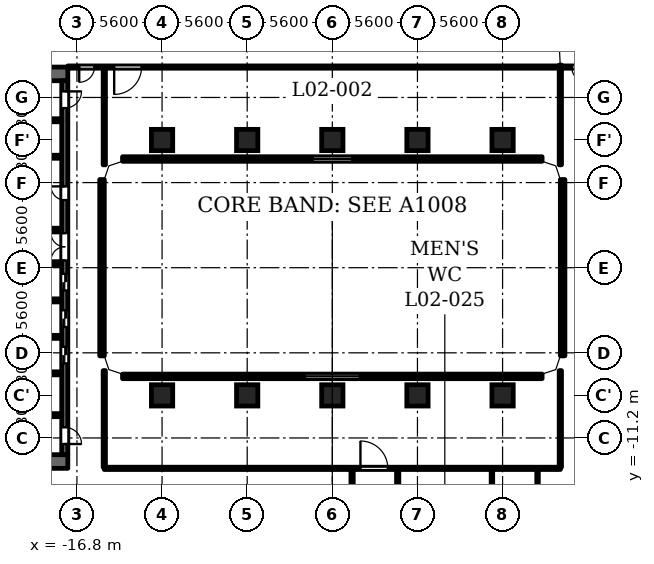
"""IFC4 building model, lengths in metres.
Left out: names, types, materials, properties, quantities, classifications, styles, units other than length and angle.
Written with IfcOpenShell. Run it as: python <this file> out.ifc"""

import sys

from ifc_helpers import new_model, si_unit, direction, frame, frame_2d, origin, origin_2d, place, context, subcontext, project, spatial, polyline, rectangle, outline, extrude, element, fill, save


model = new_model("IFC4")
c1 = context("Model", 3, precision=1e-05, world=origin(), true_north=direction((0.0, 1.0)))
c2 = subcontext(c1, "Body", "Model", "MODEL_VIEW")
j1 = project(units=[si_unit("LENGTHUNIT", "METRE"), si_unit("PLANEANGLEUNIT", "RADIAN")], contexts=[c1])
p1 = place(None, origin())
s1 = spatial("IfcSite", under=j1, at=p1, CompositionType="ELEMENT")
p2 = place(p1, origin())
s2 = spatial("IfcBuilding", under=s1, at=p2, CompositionType="ELEMENT")
p3 = place(p2, frame((0.0, 0.0, 11.3)))
s3 = spatial("IfcBuildingStorey", under=s2, at=p3, CompositionType="ELEMENT", Elevation=11.3)
for number, where, z_axis, x_axis in (
    (1, (-11.2, -8.4, 0.0), (0.0, 0.0, 1.0), (1.0, 0.0, 0.0)),
    (2, (-11.2, 8.4, 0.0), (0.0, 0.0, 1.0), (1.0, 0.0, 0.0)),
    (3, (-5.6, -8.4, 0.0), (0.0, 0.0, 1.0), (1.0, 0.0, 0.0)),
    (4, (-5.6, 8.4, 0.0), (0.0, 0.0, 1.0), (1.0, 0.0, 0.0)),
    (5, (0.0, -8.4, 0.0), (0.0, 0.0, 1.0), (1.0, 0.0, 0.0)),
    (6, (0.0, 8.4, 0.0), (0.0, 0.0, 1.0), (1.0, 0.0, 0.0)),
    (7, (5.6, -8.4, 0.0), (0.0, 0.0, 1.0), (1.0, 0.0, 0.0)),
    (8, (5.6, 8.4, 0.0), (0.0, 0.0, 1.0), (1.0, 0.0, 0.0)),
    (9, (11.2, -8.4, 0.0), (0.0, 0.0, 1.0), (1.0, 0.0, 0.0)),
    (10, (11.2, 8.4, 0.0), (0.0, 0.0, 1.0), (1.0, 0.0, 0.0)),
):
    element("IfcColumn", number, at=place(p3, frame(where, z_axis=z_axis, x_axis=x_axis)), inside=s3, PredefinedType="COLUMN", context=c2, shape_type="SweptSolid", body=[
        extrude(rectangle(XDim=1.4, YDim=1.4, at=origin_2d()), origin(), (0.0, 0.0, 1.0), 4.8),
    ])
p4 = place(p3, frame((-15.15, -5.8, 0.0), z_axis=(0.0, 0.0, 1.0), x_axis=(0.0, 1.0, 0.0)))
e11 = element("IfcWall", 11, at=p4, inside=s3, PredefinedType="SOLIDWALL", context=c2, shape_type="SweptSolid", body=[
    extrude(rectangle(XDim=11.6, YDim=0.3, at=frame_2d((5.8, 0.0))), origin(), (0.0, 0.0, 1.0), 4.45),
])
p5 = place(p3, frame((-13.8, 7.15, 0.0), z_axis=(0.0, 0.0, 1.0), x_axis=(1.0, 0.0, 0.0)))
e12 = element("IfcWall", 12, at=p5, inside=s3, PredefinedType="SOLIDWALL", context=c2, shape_type="SweptSolid", body=[
    extrude(rectangle(XDim=27.6, YDim=0.3, at=frame_2d((13.8, 0.0))), origin(), (0.0, 0.0, 1.0), 4.45),
])
p6 = place(p5, frame((12.5, 0.0, 0.9)))
e13 = element("IfcOpeningElement", 13, at=p6, cuts=e12, PredefinedType="OPENING", context=c2, shape_type="SweptSolid", body=[
    extrude(rectangle(XDim=2.6, YDim=1.25, at=frame_2d((1.3, 0.625))), frame((0.0, 0.16, 0.0), z_axis=(0.0, -1.0, 0.0), x_axis=(1.0, 0.0, 0.0)), (0.0, 0.0, 1.0), 0.32),
])
p7 = place(p3, frame((15.15, 5.8, 0.0), z_axis=(0.0, 0.0, 1.0), x_axis=(0.0, -1.0, 0.0)))
e14 = element("IfcWall", 14, at=p7, inside=s3, PredefinedType="SOLIDWALL", context=c2, shape_type="SweptSolid", body=[
    extrude(rectangle(XDim=11.6, YDim=0.3, at=frame_2d((5.8, 0.0))), origin(), (0.0, 0.0, 1.0), 4.45),
])
p8 = place(p3, frame((13.8, -7.15, 0.0), z_axis=(0.0, 0.0, 1.0), x_axis=(-1.0, 0.0, 0.0)))
e15 = element("IfcWall", 15, at=p8, inside=s3, PredefinedType="SOLIDWALL", context=c2, shape_type="SweptSolid", body=[
    extrude(rectangle(XDim=27.6, YDim=0.3, at=frame_2d((13.8, 0.0))), origin(), (0.0, 0.0, 1.0), 4.45),
])
p9 = place(p8, frame((12.0, 0.0, 1.2)))
e16 = element("IfcOpeningElement", 16, at=p9, cuts=e15, PredefinedType="OPENING", context=c2, shape_type="SweptSolid", body=[
    extrude(rectangle(XDim=3.6, YDim=0.95, at=frame_2d((1.8, 0.475))), frame((0.0, 0.16, 0.0), z_axis=(0.0, -1.0, 0.0), x_axis=(1.0, 0.0, 0.0)), (0.0, 0.0, 1.0), 0.32),
])
for number, where, z_axis, x_axis in (
    (17, (-17.4, 12.75, 0.0), (0.0, 0.0, 1.0), (-1.0, 0.0, 0.0)),
    (18, (-17.4, -12.75, 0.0), (0.0, 0.0, 1.0), (-1.0, 0.0, 0.0)),
):
    element("IfcWall", number, at=place(p3, frame(where, z_axis=z_axis, x_axis=x_axis)), inside=s3, PredefinedType="SHEAR", context=c2, shape_type="SweptSolid", body=[
        extrude(rectangle(XDim=10.4, YDim=0.9, at=frame_2d((5.2, 0.0))), origin(), (0.0, 0.0, 1.0), 4.45),
    ])
p10 = place(p3, frame((-17.6, -12.3, 0.0), z_axis=(0.0, 0.0, 1.0), x_axis=(0.0, 1.0, 0.0)))
e19 = element("IfcWall", 19, at=p10, inside=s3, PredefinedType="SHEAR", context=c2, shape_type="SweptSolid", body=[
    extrude(rectangle(XDim=24.6, YDim=0.4, at=frame_2d((12.3, 0.0))), origin(), (0.0, 0.0, 1.0), 4.45),
])
p11 = place(p10, frame((6.0, 0.0, 0.0)))
e20 = element("IfcOpeningElement", 20, at=p11, cuts=e19, PredefinedType="OPENING", context=c2, shape_type="SweptSolid", body=[
    extrude(rectangle(XDim=1.1, YDim=2.1, at=frame_2d((0.55, 1.05))), frame((0.0, 0.21, 0.0), z_axis=(0.0, -1.0, 0.0), x_axis=(1.0, 0.0, 0.0)), (0.0, 0.0, 1.0), 0.42),
])
p12 = place(p10, frame((8.4, 0.0, 0.0)))
e21 = element("IfcOpeningElement", 21, at=p12, cuts=e19, PredefinedType="OPENING", context=c2, shape_type="SweptSolid", body=[
    extrude(rectangle(XDim=1.1, YDim=2.1, at=frame_2d((0.55, 1.05))), frame((0.0, 0.21, 0.0), z_axis=(0.0, -1.0, 0.0), x_axis=(1.0, 0.0, 0.0)), (0.0, 0.0, 1.0), 0.42),
])
p13 = place(p10, frame((10.8, 0.0, 0.0)))
e22 = element("IfcOpeningElement", 22, at=p13, cuts=e19, PredefinedType="OPENING", context=c2, shape_type="SweptSolid", body=[
    extrude(rectangle(XDim=1.1, YDim=2.1, at=frame_2d((0.55, 1.05))), frame((0.0, 0.21, 0.0), z_axis=(0.0, -1.0, 0.0), x_axis=(1.0, 0.0, 0.0)), (0.0, 0.0, 1.0), 0.42),
])
p14 = place(p10, frame((16.75, 0.0, 0.0)))
e23 = element("IfcOpeningElement", 23, at=p14, cuts=e19, PredefinedType="OPENING", context=c2, shape_type="SweptSolid", body=[
    extrude(rectangle(XDim=0.9, YDim=2.1, at=frame_2d((0.45, 1.05))), frame((0.0, 0.21, 0.0), z_axis=(0.0, -1.0, 0.0), x_axis=(1.0, 0.0, 0.0)), (0.0, 0.0, 1.0), 0.42),
])
p15 = place(p10, frame((22.8, 0.0, 0.0)))
e24 = element("IfcOpeningElement", 24, at=p15, cuts=e19, PredefinedType="OPENING", context=c2, shape_type="SweptSolid", body=[
    extrude(rectangle(XDim=1.1, YDim=2.1, at=frame_2d((0.55, 1.05))), frame((0.0, 0.21, 0.0), z_axis=(0.0, -1.0, 0.0), x_axis=(1.0, 0.0, 0.0)), (0.0, 0.0, 1.0), 0.42),
])
p16 = place(p10, frame((0.7, 0.0, 0.0)))
e25 = element("IfcOpeningElement", 25, at=p16, cuts=e19, PredefinedType="OPENING", context=c2, shape_type="SweptSolid", body=[
    extrude(rectangle(XDim=1.1, YDim=2.1, at=frame_2d((0.55, 1.05))), frame((0.0, 0.21, 0.0), z_axis=(0.0, -1.0, 0.0), x_axis=(1.0, 0.0, 0.0)), (0.0, 0.0, 1.0), 0.42),
])
p17 = place(p10, frame((12.775, 0.0, 0.0)))
e26 = element("IfcOpeningElement", 26, at=p17, cuts=e19, PredefinedType="OPENING", context=c2, shape_type="SweptSolid", body=[
    extrude(rectangle(XDim=1.8, YDim=2.1, at=frame_2d((0.9, 1.05))), frame((0.0, 0.21, 0.0), z_axis=(0.0, -1.0, 0.0), x_axis=(1.0, 0.0, 0.0)), (0.0, 0.0, 1.0), 0.42),
])
p18 = place(p3, frame((-17.8, -9.7, 0.0), z_axis=(0.0, 0.0, 1.0), x_axis=(-1.0, 0.0, 0.0)))
e27 = element("IfcWall", 27, at=p18, inside=s3, PredefinedType="SHEAR", context=c2, shape_type="SweptSolid", body=[
    extrude(rectangle(XDim=8.3, YDim=0.2, at=frame_2d((4.15, 0.0))), origin(), (0.0, 0.0, 1.0), 4.45),
])
p19 = place(p18, frame((0.85, 0.0, 0.0)))
e28 = element("IfcOpeningElement", 28, at=p19, cuts=e27, PredefinedType="OPENING", context=c2, shape_type="SweptSolid", body=[
    extrude(rectangle(XDim=1.1, YDim=2.1, at=frame_2d((0.55, 1.05))), frame((0.0, 0.11, 0.0), z_axis=(0.0, -1.0, 0.0), x_axis=(1.0, 0.0, 0.0)), (0.0, 0.0, 1.0), 0.22),
])
p20 = place(p18, frame((3.75, 0.0, 0.0)))
e29 = element("IfcOpeningElement", 29, at=p20, cuts=e27, PredefinedType="OPENING", context=c2, shape_type="SweptSolid", body=[
    extrude(rectangle(XDim=1.1, YDim=2.1, at=frame_2d((0.55, 1.05))), frame((0.0, 0.11, 0.0), z_axis=(0.0, -1.0, 0.0), x_axis=(1.0, 0.0, 0.0)), (0.0, 0.0, 1.0), 0.22),
])
for number, where, z_axis, x_axis in (
    (30, (-17.8, -6.95, 0.0), (0.0, 0.0, 1.0), (-1.0, 0.0, 0.0)),
    (31, (-17.8, -4.55, 0.0), (0.0, 0.0, 1.0), (-1.0, 0.0, 0.0)),
    (32, (-17.8, -2.15, 0.0), (0.0, 0.0, 1.0), (-1.0, 0.0, 0.0)),
):
    element("IfcWall", number, at=place(p3, frame(where, z_axis=z_axis, x_axis=x_axis)), inside=s3, PredefinedType="PARTITIONING", context=c2, shape_type="SweptSolid", body=[
        extrude(rectangle(XDim=2.8, YDim=0.2, at=frame_2d((1.4, 0.0))), origin(), (0.0, 0.0, 1.0), 4.45),
    ])
for number, where, z_axis, x_axis in (
    (33, (-17.8, 0.25, 0.0), (0.0, 0.0, 1.0), (-1.0, 0.0, 0.0)),
    (34, (-17.8, 2.5, 0.0), (0.0, 0.0, 1.0), (-1.0, 0.0, 0.0)),
):
    element("IfcWall", number, at=place(p3, frame(where, z_axis=z_axis, x_axis=x_axis)), inside=s3, PredefinedType="PARTITIONING", context=c2, shape_type="SweptSolid", body=[
        extrude(rectangle(XDim=3.0, YDim=0.2, at=frame_2d((1.5, 0.0))), origin(), (0.0, 0.0, 1.0), 4.45),
    ])
p21 = place(p3, frame((-17.8, 7.3, 0.0), z_axis=(0.0, 0.0, 1.0), x_axis=(-1.0, 0.0, 0.0)))
e35 = element("IfcWall", 35, at=p21, inside=s3, PredefinedType="PARTITIONING", context=c2, shape_type="SweptSolid", body=[
    extrude(rectangle(XDim=2.8, YDim=0.2, at=frame_2d((1.4, 0.0))), origin(), (0.0, 0.0, 1.0), 4.45),
])
p22 = place(p3, frame((-17.8, 9.7, 0.0), z_axis=(0.0, 0.0, 1.0), x_axis=(-1.0, 0.0, 0.0)))
e36 = element("IfcWall", 36, at=p22, inside=s3, PredefinedType="SHEAR", context=c2, shape_type="SweptSolid", body=[
    extrude(rectangle(XDim=8.3, YDim=0.2, at=frame_2d((4.15, 0.0))), origin(), (0.0, 0.0, 1.0), 4.45),
])
p23 = place(p22, frame((0.85, 0.0, 0.0)))
e37 = element("IfcOpeningElement", 37, at=p23, cuts=e36, PredefinedType="OPENING", context=c2, shape_type="SweptSolid", body=[
    extrude(rectangle(XDim=1.1, YDim=2.1, at=frame_2d((0.55, 1.05))), frame((0.0, 0.11, 0.0), z_axis=(0.0, -1.0, 0.0), x_axis=(1.0, 0.0, 0.0)), (0.0, 0.0, 1.0), 0.22),
])
p24 = place(p22, frame((3.75, 0.0, 0.0)))
e38 = element("IfcOpeningElement", 38, at=p24, cuts=e36, PredefinedType="OPENING", context=c2, shape_type="SweptSolid", body=[
    extrude(rectangle(XDim=1.1, YDim=2.1, at=frame_2d((0.55, 1.05))), frame((0.0, 0.11, 0.0), z_axis=(0.0, -1.0, 0.0), x_axis=(1.0, 0.0, 0.0)), (0.0, 0.0, 1.0), 0.22),
])
p25 = place(p3, frame((-15.005, -13.2, 0.0), z_axis=(0.0, 0.0, 1.0), x_axis=(1.0, 0.0, 0.0)))
e39 = element("IfcWall", 39, at=p25, inside=s3, PredefinedType="PARTITIONING", context=c2, shape_type="SweptSolid", body=[
    extrude(rectangle(XDim=30.01, YDim=0.15, at=frame_2d((15.005, 0.0))), origin(), (0.0, 0.0, 1.0), 4.45),
])
p26 = place(p25, frame((16.855, 0.0, 0.0)))
e40 = element("IfcOpeningElement", 40, at=p26, cuts=e39, PredefinedType="OPENING", context=c2, shape_type="SweptSolid", body=[
    extrude(rectangle(XDim=1.8, YDim=2.1, at=frame_2d((0.9, 1.05))), frame((0.0, 0.085, 0.0), z_axis=(0.0, -1.0, 0.0), x_axis=(1.0, 0.0, 0.0)), (0.0, 0.0, 1.0), 0.17),
])
p27 = place(p3, frame((-17.4, 13.2, 0.0), z_axis=(0.0, 0.0, 1.0), x_axis=(1.0, 0.0, 0.0)))
e41 = element("IfcWall", 41, at=p27, inside=s3, PredefinedType="PARTITIONING", context=c2, shape_type="SweptSolid", body=[
    extrude(rectangle(XDim=34.8, YDim=0.15, at=frame_2d((17.4, 0.0))), origin(), (0.0, 0.0, 1.0), 4.45),
])
p28 = place(p27, frame((3.05, 0.0, 0.0)))
e42 = element("IfcOpeningElement", 42, at=p28, cuts=e41, PredefinedType="OPENING", context=c2, shape_type="SweptSolid", body=[
    extrude(rectangle(XDim=1.8, YDim=2.1, at=frame_2d((0.9, 1.05))), frame((0.0, 0.085, 0.0), z_axis=(0.0, -1.0, 0.0), x_axis=(1.0, 0.0, 0.0)), (0.0, 0.0, 1.0), 0.17),
])
p29 = place(p27, frame((0.75, 0.0, 0.0)))
e43 = element("IfcOpeningElement", 43, at=p29, cuts=e41, PredefinedType="OPENING", context=c2, shape_type="SweptSolid", body=[
    extrude(rectangle(XDim=1.0, YDim=2.1, at=frame_2d((0.5, 1.05))), frame((0.0, 0.085, 0.0), z_axis=(0.0, -1.0, 0.0), x_axis=(1.0, 0.0, 0.0)), (0.0, 0.0, 1.0), 0.17),
])
p30 = place(p27, frame((33.15, 0.0, 0.0)))
e44 = element("IfcOpeningElement", 44, at=p30, cuts=e41, PredefinedType="OPENING", context=c2, shape_type="SweptSolid", body=[
    extrude(rectangle(XDim=1.0, YDim=2.1, at=frame_2d((0.5, 1.05))), frame((0.0, 0.085, 0.0), z_axis=(0.0, -1.0, 0.0), x_axis=(1.0, 0.0, 0.0)), (0.0, 0.0, 1.0), 0.17),
])
for number, where, z_axis, x_axis in (
    (45, (-15.0, -13.125, 0.0), (0.0, 0.0, 1.0), (0.0, 1.0, 0.0)),
    (46, (-15.0, 6.769, 0.0), (0.0, 0.0, 1.0), (0.0, 1.0, 0.0)),
):
    element("IfcWall", number, at=place(p3, frame(where, z_axis=z_axis, x_axis=x_axis)), inside=s3, PredefinedType="PARTITIONING", context=c2, shape_type="SweptSolid", body=[
        extrude(rectangle(XDim=6.356, YDim=0.15, at=frame_2d((3.178, 0.0))), origin(), (0.0, 0.0, 1.0), 4.45),
    ])
for number, where, z_axis, x_axis in (
    (47, (1.3, -22.325, 0.0), (0.0, 0.0, 1.0), (0.0, 1.0, 0.0)),
    (48, (4.3, -22.325, 0.0), (0.0, 0.0, 1.0), (0.0, 1.0, 0.0)),
):
    element("IfcWall", number, at=place(p3, frame(where, z_axis=z_axis, x_axis=x_axis)), inside=s3, PredefinedType="PARTITIONING", context=c2, shape_type="SweptSolid", body=[
        extrude(rectangle(XDim=9.05, YDim=0.15, at=frame_2d((4.525, 0.0))), origin(), (0.0, 0.0, 1.0), 4.45),
    ])
for number, where, z_axis, x_axis in (
    (49, (10.5, -22.325, 0.0), (0.0, 0.0, 1.0), (0.0, 1.0, 0.0)),
    (50, (13.5, -22.325, 0.0), (0.0, 0.0, 1.0), (0.0, 1.0, 0.0)),
):
    element("IfcWall", number, at=place(p3, frame(where, z_axis=z_axis, x_axis=x_axis)), inside=s3, PredefinedType="PARTITIONING", context=c2, shape_type="SweptSolid", body=[
        extrude(rectangle(XDim=9.05, YDim=0.1, at=frame_2d((4.525, 0.0))), origin(), (0.0, 0.0, 1.0), 4.45),
    ])
for number, where, z_axis, x_axis in (
    (51, (15.0, -13.125, 0.0), (0.0, 0.0, 1.0), (0.0, 1.0, 0.0)),
    (52, (15.0, 6.769, 0.0), (0.0, 0.0, 1.0), (0.0, 1.0, 0.0)),
):
    element("IfcWall", number, at=place(p3, frame(where, z_axis=z_axis, x_axis=x_axis)), inside=s3, PredefinedType="PARTITIONING", context=c2, shape_type="SweptSolid", body=[
        extrude(rectangle(XDim=6.356, YDim=0.15, at=frame_2d((3.178, 0.0))), origin(), (0.0, 0.0, 1.0), 4.45),
    ])
p31 = place(p3, origin())
e53 = element("IfcWall", 53, at=p31, inside=s3, PredefinedType="SOLIDWALL", context=c2, shape_type="SweptSolid", body=[
    extrude(outline(polyline([(-13.849, 7.3), (-14.937, 6.937), (-15.3, 5.849), (-15.3, 5.8), (-15.0, 5.8), (-14.7, 6.7), (-13.8, 7.0), (-13.8, 7.3), (-13.849, 7.3)])), origin(), (0.0, 0.0, 1.0), 4.45),
])
e54 = element("IfcWall", 54, at=p31, inside=s3, PredefinedType="SOLIDWALL", context=c2, shape_type="SweptSolid", body=[
    extrude(outline(polyline([(14.937, 6.937), (13.849, 7.3), (13.8, 7.3), (13.8, 7.0), (14.7, 6.7), (15.0, 5.8), (15.3, 5.8), (15.3, 5.849), (14.937, 6.937)])), origin(), (0.0, 0.0, 1.0), 4.45),
])
e55 = element("IfcWall", 55, at=p31, inside=s3, PredefinedType="SOLIDWALL", context=c2, shape_type="SweptSolid", body=[
    extrude(outline(polyline([(14.937, -6.937), (15.3, -5.849), (15.3, -5.8), (15.0, -5.8), (14.7, -6.7), (13.8, -7.0), (13.8, -7.3), (13.849, -7.3), (14.937, -6.937)])), origin(), (0.0, 0.0, 1.0), 4.45),
])
e56 = element("IfcWall", 56, at=p31, inside=s3, PredefinedType="SOLIDWALL", context=c2, shape_type="SweptSolid", body=[
    extrude(outline(polyline([(-14.937, -6.937), (-13.849, -7.3), (-13.8, -7.3), (-13.8, -7.0), (-14.7, -6.7), (-15.0, -5.8), (-15.3, -5.8), (-15.3, -5.849), (-14.937, -6.937)])), origin(), (0.0, 0.0, 1.0), 4.45),
])
p32 = place(p11, origin())
e57 = element("IfcDoor", 57, at=p32, inside=s3, OperationType="DOUBLE_DOOR_SLIDING", PredefinedType="DOOR", context=c2, shape_type="SweptSolid", body=[
    extrude(rectangle(XDim=1.1, YDim=2.1, at=frame_2d((0.55, 1.05))), frame((0.0, 0.025, 0.0), z_axis=(0.0, -1.0, 0.0), x_axis=(1.0, 0.0, 0.0)), (0.0, 0.0, 1.0), 0.05),
])
fill(e20, e57)
p33 = place(p12, origin())
e58 = element("IfcDoor", 58, at=p33, inside=s3, OperationType="DOUBLE_DOOR_SLIDING", PredefinedType="DOOR", context=c2, shape_type="SweptSolid", body=[
    extrude(rectangle(XDim=1.1, YDim=2.1, at=frame_2d((0.55, 1.05))), frame((0.0, 0.025, 0.0), z_axis=(0.0, -1.0, 0.0), x_axis=(1.0, 0.0, 0.0)), (0.0, 0.0, 1.0), 0.05),
])
fill(e21, e58)
p34 = place(p13, origin())
e59 = element("IfcDoor", 59, at=p34, inside=s3, OperationType="DOUBLE_DOOR_SLIDING", PredefinedType="DOOR", context=c2, shape_type="SweptSolid", body=[
    extrude(rectangle(XDim=1.1, YDim=2.1, at=frame_2d((0.55, 1.05))), frame((0.0, 0.025, 0.0), z_axis=(0.0, -1.0, 0.0), x_axis=(1.0, 0.0, 0.0)), (0.0, 0.0, 1.0), 0.05),
])
fill(e22, e59)
p35 = place(p14, origin())
e60 = element("IfcDoor", 60, at=p35, inside=s3, OperationType="SINGLE_SWING_LEFT", PredefinedType="DOOR", context=c2, shape_type="SweptSolid", body=[
    extrude(rectangle(XDim=0.9, YDim=2.1, at=frame_2d((0.45, 1.05))), frame((0.0, 0.025, 0.0), z_axis=(0.0, -1.0, 0.0), x_axis=(1.0, 0.0, 0.0)), (0.0, 0.0, 1.0), 0.05),
])
fill(e23, e60)
p36 = place(p15, origin())
e61 = element("IfcDoor", 61, at=p36, inside=s3, OperationType="SINGLE_SWING_RIGHT", PredefinedType="DOOR", context=c2, shape_type="SweptSolid", body=[
    extrude(rectangle(XDim=1.1, YDim=2.1, at=frame_2d((0.55, 1.05))), frame((0.0, 0.025, 0.0), z_axis=(0.0, -1.0, 0.0), x_axis=(1.0, 0.0, 0.0)), (0.0, 0.0, 1.0), 0.05),
])
fill(e24, e61)
p37 = place(p16, origin())
e62 = element("IfcDoor", 62, at=p37, inside=s3, OperationType="SINGLE_SWING_LEFT", PredefinedType="DOOR", context=c2, shape_type="SweptSolid", body=[
    extrude(rectangle(XDim=1.1, YDim=2.1, at=frame_2d((0.55, 1.05))), frame((0.0, 0.025, 0.0), z_axis=(0.0, -1.0, 0.0), x_axis=(1.0, 0.0, 0.0)), (0.0, 0.0, 1.0), 0.05),
])
fill(e25, e62)
p38 = place(p17, origin())
e63 = element("IfcDoor", 63, at=p38, inside=s3, OperationType="DOUBLE_DOOR_SINGLE_SWING", PredefinedType="DOOR", context=c2, shape_type="SweptSolid", body=[
    extrude(rectangle(XDim=1.8, YDim=2.1, at=frame_2d((0.9, 1.05))), frame((0.0, 0.025, 0.0), z_axis=(0.0, -1.0, 0.0), x_axis=(1.0, 0.0, 0.0)), (0.0, 0.0, 1.0), 0.05),
])
fill(e26, e63)
p39 = place(p28, origin())
e64 = element("IfcDoor", 64, at=p39, inside=s3, OperationType="SINGLE_SWING_LEFT", PredefinedType="DOOR", context=c2, shape_type="SweptSolid", body=[
    extrude(rectangle(XDim=1.8, YDim=2.1, at=frame_2d((0.9, 1.05))), frame((0.0, 0.025, 0.0), z_axis=(0.0, -1.0, 0.0), x_axis=(1.0, 0.0, 0.0)), (0.0, 0.0, 1.0), 0.05),
])
fill(e42, e64)
p40 = place(p29, origin())
e65 = element("IfcDoor", 65, at=p40, inside=s3, OperationType="SINGLE_SWING_LEFT", PredefinedType="DOOR", context=c2, shape_type="SweptSolid", body=[
    extrude(rectangle(XDim=1.0, YDim=2.1, at=frame_2d((0.5, 1.05))), frame((0.0, 0.025, 0.0), z_axis=(0.0, -1.0, 0.0), x_axis=(1.0, 0.0, 0.0)), (0.0, 0.0, 1.0), 0.05),
])
fill(e43, e65)
p41 = place(p30, origin())
e66 = element("IfcDoor", 66, at=p41, inside=s3, OperationType="SINGLE_SWING_RIGHT", PredefinedType="DOOR", context=c2, shape_type="SweptSolid", body=[
    extrude(rectangle(XDim=1.0, YDim=2.1, at=frame_2d((0.5, 1.05))), frame((0.0, 0.025, 0.0), z_axis=(0.0, -1.0, 0.0), x_axis=(1.0, 0.0, 0.0)), (0.0, 0.0, 1.0), 0.05),
])
fill(e44, e66)
p42 = place(p26, origin())
e67 = element("IfcDoor", 67, at=p42, inside=s3, OperationType="SINGLE_SWING_RIGHT", PredefinedType="DOOR", context=c2, shape_type="SweptSolid", body=[
    extrude(rectangle(XDim=1.8, YDim=2.1, at=frame_2d((0.9, 1.05))), frame((0.0, 0.025, 0.0), z_axis=(0.0, -1.0, 0.0), x_axis=(1.0, 0.0, 0.0)), (0.0, 0.0, 1.0), 0.05),
])
fill(e40, e67)
p43 = place(p6, origin())
e68 = element("IfcWindow", 68, at=p43, inside=s3, PartitioningType="SINGLE_PANEL", PredefinedType="WINDOW", context=c2, shape_type="SweptSolid", body=[
    extrude(rectangle(XDim=2.6, YDim=1.25, at=frame_2d((1.3, 0.625))), frame((0.0, 0.03, 0.0), z_axis=(0.0, -1.0, 0.0), x_axis=(1.0, 0.0, 0.0)), (0.0, 0.0, 1.0), 0.06),
])
fill(e13, e68)
p44 = place(p9, origin())
e69 = element("IfcWindow", 69, at=p44, inside=s3, PartitioningType="SINGLE_PANEL", PredefinedType="WINDOW", context=c2, shape_type="SweptSolid", body=[
    extrude(rectangle(XDim=3.6, YDim=0.95, at=frame_2d((1.8, 0.475))), frame((0.0, 0.03, 0.0), z_axis=(0.0, -1.0, 0.0), x_axis=(1.0, 0.0, 0.0)), (0.0, 0.0, 1.0), 0.06),
])
fill(e16, e69)
save(model, sys.argv[1])
